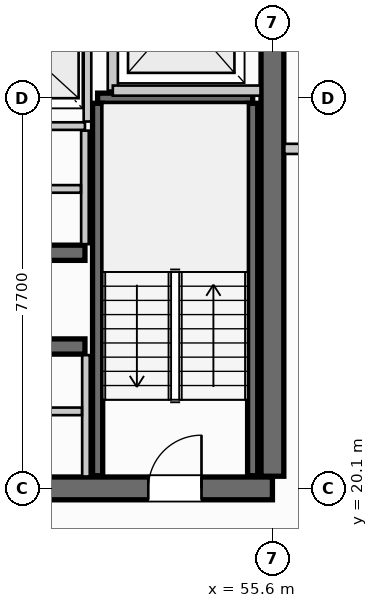
"""IFC4 building model, lengths in metres.
Left out: names, types, materials, properties, quantities, classifications, styles, units other than length and angle.
Written with IfcOpenShell. Run it as: python <this file> out.ifc"""

import sys

from ifc_helpers import new_model, si_unit, direction, frame, frame_2d, origin, place, context, subcontext, project, spatial, rectangle, extrude, source, transform, mapped, element, fill, save


model = new_model("IFC4")
c1 = context("Model", 3, precision=1e-05, world=origin(), true_north=direction((0.0, 1.0)))
c2 = subcontext(c1, "Body", "Model", "MODEL_VIEW")
j1 = project(units=[si_unit("LENGTHUNIT", "METRE"), si_unit("PLANEANGLEUNIT", "RADIAN")], contexts=[c1])
p1 = place(None, origin())
s1 = spatial("IfcSite", under=j1, at=p1, CompositionType="ELEMENT")
p2 = place(p1, origin())
s2 = spatial("IfcBuilding", under=s1, at=p2, CompositionType="ELEMENT")
p3 = place(p2, frame((0.0, 0.0, 283.6)))
s3 = spatial("IfcBuildingStorey", under=s2, at=p3, CompositionType="ELEMENT", Elevation=283.6)
p4 = place(p3, frame((38.0, 20.1, 0.0), z_axis=(0.0, 0.0, 1.0), x_axis=(1.0, 0.0, 0.0)))
e1 = element("IfcWall", 1, at=p4, inside=s3, PredefinedType="SHEAR", context=c2, shape_type="SweptSolid", body=[
    extrude(rectangle(XDim=17.6, YDim=0.45, at=frame_2d((8.8, 0.0))), origin(), (0.0, 0.0, 1.0), 3.21),
])
p5 = place(p4, frame((1.4, 0.0, 0.0)))
e2 = element("IfcOpeningElement", 2, at=p5, cuts=e1, PredefinedType="OPENING", context=c2, shape_type="SweptSolid", body=[
    extrude(rectangle(XDim=1.05, YDim=2.15, at=frame_2d((0.525, 1.075))), frame((0.0, 0.235, 0.0), z_axis=(0.0, -1.0, 0.0), x_axis=(1.0, 0.0, 0.0)), (0.0, 0.0, 1.0), 0.47),
])
p6 = place(p4, frame((15.15, 0.0, 0.0)))
e3 = element("IfcOpeningElement", 3, at=p6, cuts=e1, PredefinedType="OPENING", context=c2, shape_type="SweptSolid", body=[
    extrude(rectangle(XDim=1.05, YDim=2.15, at=frame_2d((0.525, 1.075))), frame((0.0, 0.235, 0.0), z_axis=(0.0, -1.0, 0.0), x_axis=(1.0, 0.0, 0.0)), (0.0, 0.0, 1.0), 0.47),
])
p7 = place(p4, frame((5.25, 0.0, 0.0)))
e4 = element("IfcOpeningElement", 4, at=p7, cuts=e1, PredefinedType="OPENING", context=c2, shape_type="SweptSolid", body=[
    extrude(rectangle(XDim=0.9, YDim=2.15, at=frame_2d((0.45, 1.075))), frame((0.0, 0.235, 0.0), z_axis=(0.0, -1.0, 0.0), x_axis=(1.0, 0.0, 0.0)), (0.0, 0.0, 1.0), 0.47),
])
p8 = place(p4, frame((11.4, 0.0, 0.0)))
e5 = element("IfcOpeningElement", 5, at=p8, cuts=e1, PredefinedType="OPENING", context=c2, shape_type="SweptSolid", body=[
    extrude(rectangle(XDim=0.95, YDim=2.15, at=frame_2d((0.475, 1.075))), frame((0.0, 0.235, 0.0), z_axis=(0.0, -1.0, 0.0), x_axis=(1.0, 0.0, 0.0)), (0.0, 0.0, 1.0), 0.47),
])
p9 = place(p3, frame((55.6, 20.34, 0.0), z_axis=(0.0, 0.0, 1.0), x_axis=(0.0, 1.0, 0.0)))
e6 = element("IfcWall", 6, at=p9, inside=s3, PredefinedType="SHEAR", context=c2, shape_type="SweptSolid", body=[
    extrude(rectangle(XDim=14.92, YDim=0.45, at=frame_2d((7.46, 0.0))), origin(), (0.0, 0.0, 1.0), 3.21),
])
p10 = place(p9, frame((12.71, 0.0, 0.0)))
e7 = element("IfcOpeningElement", 7, at=p10, cuts=e6, PredefinedType="OPENING", context=c2, shape_type="SweptSolid", body=[
    extrude(rectangle(XDim=1.05, YDim=2.15, at=frame_2d((0.525, 1.075))), frame((0.0, 0.235, 0.0), z_axis=(0.0, -1.0, 0.0), x_axis=(1.0, 0.0, 0.0)), (0.0, 0.0, 1.0), 0.47),
])
p11 = place(p9, frame((8.61, 0.0, 0.0)))
e8 = element("IfcOpeningElement", 8, at=p11, cuts=e6, PredefinedType="OPENING", context=c2, shape_type="SweptSolid", body=[
    extrude(rectangle(XDim=1.1, YDim=2.2, at=frame_2d((0.55, 1.1))), frame((0.0, 0.235, 0.0), z_axis=(0.0, -1.0, 0.0), x_axis=(1.0, 0.0, 0.0)), (0.0, 0.0, 1.0), 0.47),
])
p12 = place(p3, frame((47.65, 22.9, 0.0), z_axis=(0.0, 0.0, 1.0), x_axis=(1.0, 0.0, 0.0)))
e9 = element("IfcWall", 9, at=p12, inside=s3, PredefinedType="SHEAR", context=c2, shape_type="SweptSolid", body=[
    extrude(rectangle(XDim=4.25, YDim=0.3, at=frame_2d((2.125, 0.0))), origin(), (0.0, 0.0, 1.0), 3.21),
])
p13 = place(p3, frame((47.65, 24.75, 0.0), z_axis=(0.0, 0.0, 1.0), x_axis=(1.0, 0.0, 0.0)))
e10 = element("IfcWall", 10, at=p13, inside=s3, PredefinedType="SHEAR", context=c2, shape_type="SweptSolid", body=[
    extrude(rectangle(XDim=4.25, YDim=0.3, at=frame_2d((2.125, 0.0))), origin(), (0.0, 0.0, 1.0), 3.21),
])
p14 = place(p13, frame((1.55, 0.0, 0.0)))
e11 = element("IfcOpeningElement", 11, at=p14, cuts=e10, PredefinedType="OPENING", context=c2, shape_type="SweptSolid", body=[
    extrude(rectangle(XDim=0.95, YDim=2.15, at=frame_2d((0.475, 1.075))), frame((0.0, 0.16, 0.0), z_axis=(0.0, -1.0, 0.0), x_axis=(1.0, 0.0, 0.0)), (0.0, 0.0, 1.0), 0.32),
])
p15 = place(p3, frame((52.15, 27.8, 0.0), z_axis=(0.0, 0.0, 1.0), x_axis=(1.0, 0.0, 0.0)))
e12 = element("IfcWall", 12, at=p15, inside=s3, PredefinedType="SHEAR", context=c2, shape_type="SweptSolid", body=[
    extrude(rectangle(XDim=3.06, YDim=0.2, at=frame_2d((1.53, 0.0))), origin(), (0.0, 0.0, 1.0), 3.21),
])
for number, where, z_axis, x_axis in (
    (13, (55.21, 27.7, 0.0), (0.0, 0.0, 1.0), (0.0, -1.0, 0.0)),
    (14, (52.15, 20.35, 0.0), (0.0, 0.0, 1.0), (0.0, 1.0, 0.0)),
):
    element("IfcWall", number, at=place(p3, frame(where, z_axis=z_axis, x_axis=x_axis)), inside=s3, PredefinedType="SHEAR", context=c2, shape_type="SweptSolid", body=[
        extrude(rectangle(XDim=7.35, YDim=0.2, at=frame_2d((3.675, 0.0))), origin(), (0.0, 0.0, 1.0), 3.21),
    ])
p16 = place(p3, frame((52.45, 27.95, 0.0), z_axis=(0.0, 0.0, 1.0), x_axis=(0.0, 1.0, 0.0)))
e15 = element("IfcWall", 15, at=p16, inside=s3, PredefinedType="PARTITIONING", context=c2, shape_type="SweptSolid", body=[
    extrude(rectangle(XDim=3.1, YDim=0.2, at=frame_2d((1.55, 0.0))), origin(), (0.0, 0.0, 1.0), 2.455),
])
p17 = place(p3, frame((52.45, 27.95, 0.0), z_axis=(0.0, 0.0, 1.0), x_axis=(1.0, 0.0, 0.0)))
e16 = element("IfcWall", 16, at=p17, inside=s3, PredefinedType="PARTITIONING", context=c2, shape_type="SweptSolid", body=[
    extrude(rectangle(XDim=2.915, YDim=0.2, at=frame_2d((1.458, 0.0))), origin(), (0.0, 0.0, 1.0), 2.455),
])
p18 = place(p3, frame((55.835, 26.8, 0.0), z_axis=(0.0, 0.0, 1.0), x_axis=(1.0, 0.0, 0.0)))
e17 = element("IfcWall", 17, at=p18, inside=s3, PredefinedType="PARTITIONING", context=c2, shape_type="SweptSolid", body=[
    extrude(rectangle(XDim=3.265, YDim=0.2, at=frame_2d((1.633, 0.0))), origin(), (0.0, 0.0, 1.0), 2.455),
])
p19 = place(p3, frame((51.92, 20.335, 0.0), z_axis=(0.0, 0.0, 1.0), x_axis=(0.0, 1.0, 0.0)))
e18 = element("IfcWall", 18, at=p19, inside=s3, PredefinedType="PARTITIONING", context=c2, shape_type="SweptSolid", body=[
    extrude(rectangle(XDim=2.395, YDim=0.15, at=frame_2d((1.198, 0.0))), origin(), (0.0, 0.0, 1.0), 2.455),
])
p20 = place(p3, frame((47.88, 21.62, 0.0), z_axis=(0.0, 0.0, 1.0), x_axis=(1.0, 0.0, 0.0)))
e19 = element("IfcWall", 19, at=p20, inside=s3, PredefinedType="PARTITIONING", context=c2, shape_type="SweptSolid", body=[
    extrude(rectangle(XDim=3.96, YDim=0.15, at=frame_2d((1.98, 0.0))), origin(), (0.0, 0.0, 1.0), 2.455),
])
p21 = place(p20, frame((1.55, 0.0, 0.0)))
e20 = element("IfcOpeningElement", 20, at=p21, cuts=e19, PredefinedType="OPENING", context=c2, shape_type="SweptSolid", body=[
    extrude(rectangle(XDim=0.85, YDim=2.15, at=frame_2d((0.425, 1.075))), frame((0.0, 0.085, 0.0), z_axis=(0.0, -1.0, 0.0), x_axis=(1.0, 0.0, 0.0)), (0.0, 0.0, 1.0), 0.17),
])
p22 = place(p3, frame((47.65, 27.25, 0.0), z_axis=(0.0, 0.0, 1.0), x_axis=(1.0, 0.0, 0.0)))
e21 = element("IfcWall", 21, at=p22, inside=s3, PredefinedType="PARTITIONING", context=c2, shape_type="SweptSolid", body=[
    extrude(rectangle(XDim=4.25, YDim=0.15, at=frame_2d((2.125, 0.0))), origin(), (0.0, 0.0, 1.0), 2.455),
])
p23 = place(p3, frame((51.9, 24.92, 0.0), z_axis=(0.0, 0.0, 1.0), x_axis=(0.0, 1.0, 0.0)))
e22 = element("IfcWall", 22, at=p23, inside=s3, PredefinedType="PARTITIONING", context=c2, shape_type="SweptSolid", body=[
    extrude(rectangle(XDim=2.24, YDim=0.15, at=frame_2d((1.12, 0.0))), origin(), (0.0, 0.0, 1.0), 2.455),
])
p24 = place(p3, frame((47.73, 26.01, 0.0), z_axis=(0.0, 0.0, 1.0), x_axis=(1.0, 0.0, 0.0)))
e23 = element("IfcWall", 23, at=p24, inside=s3, PredefinedType="PARTITIONING", context=c2, shape_type="SweptSolid", body=[
    extrude(rectangle(XDim=4.09, YDim=0.15, at=frame_2d((2.045, 0.0))), origin(), (0.0, 0.0, 1.0), 2.455),
])
p25 = place(p24, frame((1.6, 0.0, 0.0)))
e24 = element("IfcOpeningElement", 24, at=p25, cuts=e23, PredefinedType="OPENING", context=c2, shape_type="SweptSolid", body=[
    extrude(rectangle(XDim=0.85, YDim=2.15, at=frame_2d((0.425, 1.075))), frame((0.0, 0.085, 0.0), z_axis=(0.0, -1.0, 0.0), x_axis=(1.0, 0.0, 0.0)), (0.0, 0.0, 1.0), 0.17),
])
p26 = place(p3, frame((51.95, 27.34, 0.0), z_axis=(0.0, 0.0, 1.0), x_axis=(0.0, 1.0, 0.0)))
e25 = element("IfcWall", 25, at=p26, inside=s3, PredefinedType="PARTITIONING", context=c2, shape_type="SweptSolid", body=[
    extrude(rectangle(XDim=2.34, YDim=0.15, at=frame_2d((1.17, 0.0))), origin(), (0.0, 0.0, 1.0), 2.455),
])
m1 = source(origin(), c2, "Body", "SweptSolid", [
    extrude(rectangle(XDim=1.05, YDim=2.15, at=frame_2d((0.525, 1.075))), frame((0.0, 0.025, 0.0), z_axis=(0.0, -1.0, 0.0), x_axis=(1.0, 0.0, 0.0)), (0.0, 0.0, 1.0), 0.05),
])
p27 = place(p6, origin())
e26 = element("IfcDoor", 26, at=p27, inside=s3, OperationType="SINGLE_SWING_RIGHT", PredefinedType="DOOR", context=c2, shape_type="MappedRepresentation", body=[
    mapped(m1, transform((0.0, 0.0, 0.0), scale=1.0)),
])
fill(e3, e26)
save(model, sys.argv[1])
